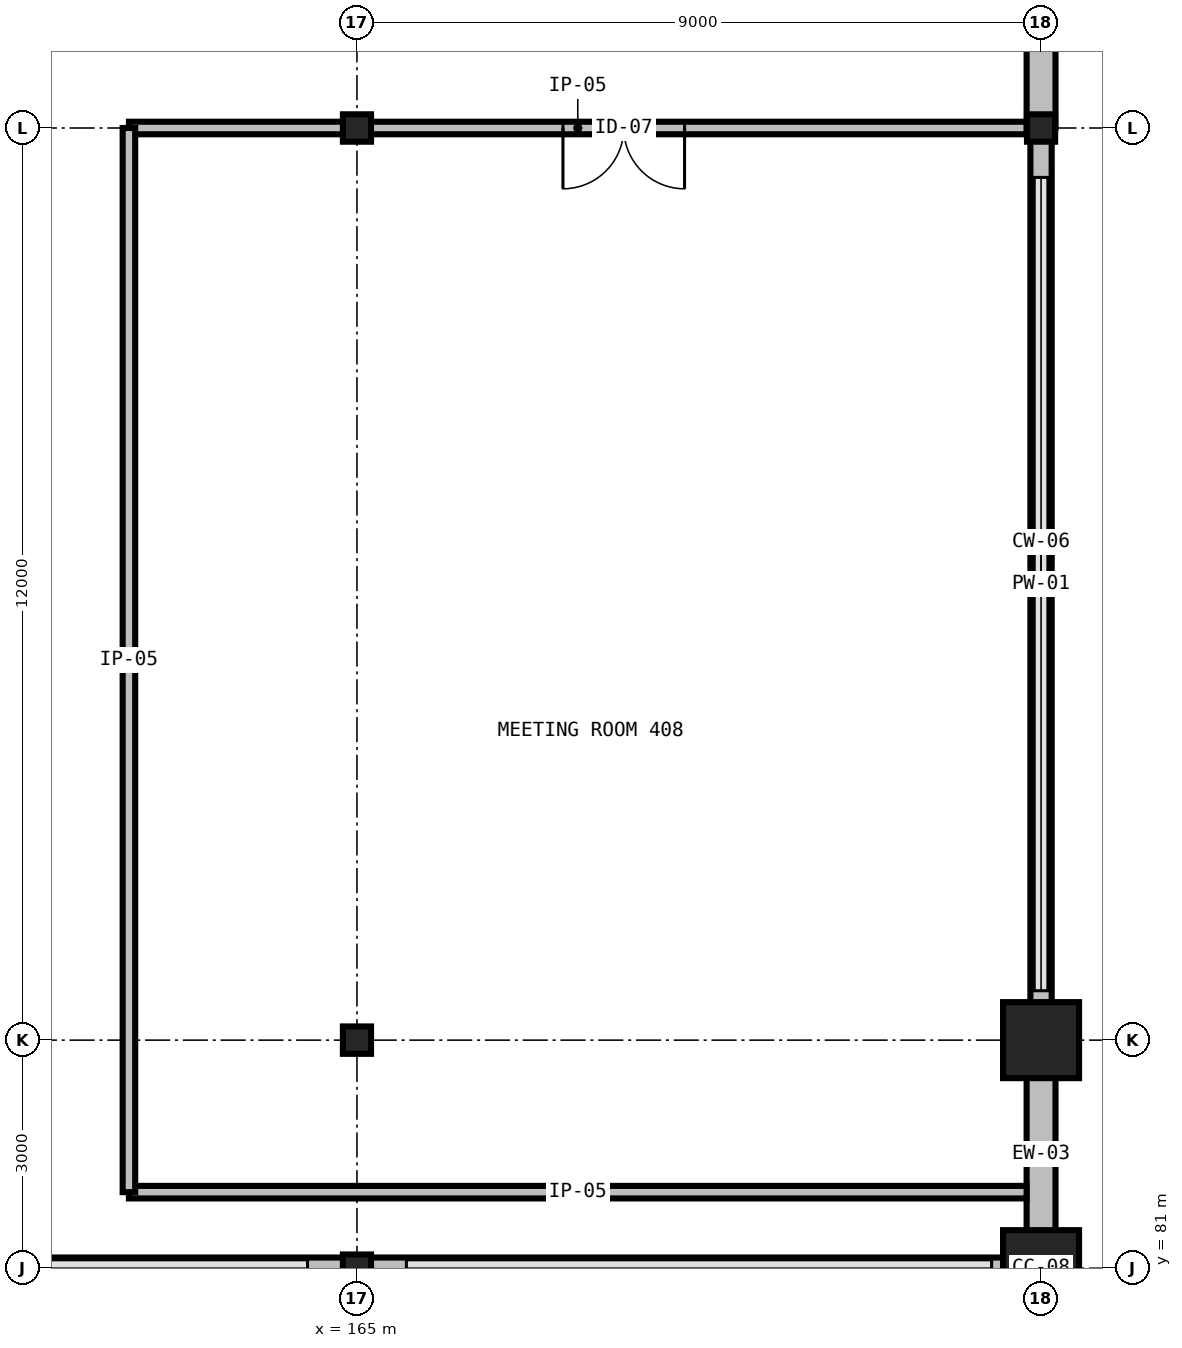
"""IFC4 building model, lengths in metres.
Left out: names, types, materials, properties, quantities, classifications, styles, units other than length and angle.
Written with IfcOpenShell. Run it as: python <this file> out.ifc"""

import sys

from ifc_helpers import new_model, si_unit, direction, frame, frame_2d, origin, origin_2d, place, context, subcontext, project, spatial, rectangle, circle, i_section, extrude, element, fill, save


model = new_model("IFC4")
c1 = context("Model", 3, precision=1e-05, world=origin(), true_north=direction((0.0, 1.0)))
c2 = subcontext(c1, "Body", "Model", "MODEL_VIEW")
j1 = project(units=[si_unit("LENGTHUNIT", "METRE"), si_unit("PLANEANGLEUNIT", "RADIAN")], contexts=[c1])
p1 = place(None, origin())
s1 = spatial("IfcSite", under=j1, at=p1, CompositionType="ELEMENT")
p2 = place(p1, origin())
s2 = spatial("IfcBuilding", under=s1, at=p2, CompositionType="ELEMENT")
p3 = place(p2, frame((0.0, 0.0, 23.4)))
s3 = spatial("IfcBuildingStorey", under=s2, at=p3, CompositionType="ELEMENT", Elevation=23.4)
for number, where, z_axis, x_axis in (
    (1, (165.0, 81.0, 0.0), (0.0, 0.0, 1.0), (1.0, 0.0, 0.0)),
    (2, (165.0, 84.0, 0.0), (0.0, 0.0, 1.0), (1.0, 0.0, 0.0)),
    (3, (165.0, 96.0, 0.0), (0.0, 0.0, 1.0), (1.0, 0.0, 0.0)),
):
    element("IfcColumn", number, at=place(p3, frame(where, z_axis=z_axis, x_axis=x_axis)), inside=s3, PredefinedType="COLUMN", context=c2, shape_type="SweptSolid", body=[
        extrude(i_section(OverallWidth=0.37, OverallDepth=0.36, WebThickness=0.012, FlangeThickness=0.02, FilletRadius=0.031, at=origin_2d()), origin(), (0.0, 0.0, 1.0), 3.85),
    ])
for number, where, z_axis, x_axis in (
    (4, (174.0, 81.0, 0.0), (0.0, 0.0, 1.0), (1.0, 0.0, 0.0)),
    (5, (174.0, 84.0, 0.0), (0.0, 0.0, 1.0), (1.0, 0.0, 0.0)),
):
    element("IfcColumn", number, at=place(p3, frame(where, z_axis=z_axis, x_axis=x_axis)), inside=s3, PredefinedType="COLUMN", context=c2, shape_type="SweptSolid", body=[
        extrude(circle(Radius=0.5, at=origin_2d()), origin(), (0.0, 0.0, 1.0), 3.85),
    ])
p4 = place(p3, frame((174.0, 96.0, 0.0), z_axis=(0.0, 0.0, 1.0), x_axis=(1.0, 0.0, 0.0)))
e6 = element("IfcColumn", 6, at=p4, inside=s3, PredefinedType="COLUMN", context=c2, shape_type="SweptSolid", body=[
    extrude(i_section(OverallWidth=0.37, OverallDepth=0.36, WebThickness=0.012, FlangeThickness=0.02, FilletRadius=0.031, at=origin_2d()), origin(), (0.0, 0.0, 1.0), 3.85),
])
p5 = place(p3, frame((174.0, 81.0, 0.0), z_axis=(0.0, 0.0, 1.0), x_axis=(0.0, 1.0, 0.0)))
e7 = element("IfcWall", 7, at=p5, inside=s3, PredefinedType="STANDARD", context=c2, shape_type="SweptSolid", body=[
    extrude(rectangle(XDim=3.0, YDim=0.38, at=frame_2d((1.5, 0.0))), origin(), (0.0, 0.0, 1.0), 3.119),
])
p6 = place(p3, frame((174.0, 84.0, 0.0), z_axis=(0.0, 0.0, 1.0), x_axis=(0.0, 1.0, 0.0)))
e8 = element("IfcWall", 8, at=p6, inside=s3, PredefinedType="PARAPET", context=c2, shape_type="SweptSolid", body=[
    extrude(rectangle(XDim=12.0, YDim=0.28, at=frame_2d((6.0, 0.0))), origin(), (0.0, 0.0, 1.0), 0.2),
])
p7 = place(p3, frame((174.0, 96.0, 0.0), z_axis=(0.0, 0.0, 1.0), x_axis=(0.0, 1.0, 0.0)))
e9 = element("IfcWall", 9, at=p7, inside=s3, PredefinedType="STANDARD", context=c2, shape_type="SweptSolid", body=[
    extrude(rectangle(XDim=9.0, YDim=0.38, at=frame_2d((4.5, 0.0))), origin(), (0.0, 0.0, 1.0), 3.119),
])
for number, where, z_axis, x_axis in (
    (10, (156.0, 81.0, 0.0), (0.0, 0.0, 1.0), (1.0, 0.0, 0.0)),
    (11, (165.0, 81.0, 0.0), (0.0, 0.0, 1.0), (1.0, 0.0, 0.0)),
):
    element("IfcWall", number, at=place(p3, frame(where, z_axis=z_axis, x_axis=x_axis)), inside=s3, PredefinedType="PARAPET", context=c2, shape_type="SweptSolid", body=[
        extrude(rectangle(XDim=9.0, YDim=0.28, at=frame_2d((4.5, 0.0))), origin(), (0.0, 0.0, 1.0), 0.2),
    ])
p8 = place(p3, frame((138.0, 81.14, 3.85), z_axis=(0.0, 0.0, 1.0), x_axis=(1.0, 0.0, 0.0)))
e12 = element("IfcWall", 12, at=p8, inside=s3, PredefinedType="PARAPET", context=c2, shape_type="SweptSolid", body=[
    extrude(rectangle(XDim=36.0, YDim=0.28, at=frame_2d((18.0, 0.0))), origin(), (0.0, 0.0, 1.0), 1.2),
])
p9 = place(p3, frame((173.86, 81.28, 3.85), z_axis=(0.0, 0.0, 1.0), x_axis=(0.0, 1.0, 0.0)))
e13 = element("IfcWall", 13, at=p9, inside=s3, PredefinedType="PARAPET", context=c2, shape_type="SweptSolid", body=[
    extrude(rectangle(XDim=35.44, YDim=0.28, at=frame_2d((17.72, 0.0))), origin(), (0.0, 0.0, 1.0), 1.2),
])
p10 = place(p3, frame((162.0, 82.0, 0.0), z_axis=(0.0, 0.0, 1.0), x_axis=(1.0, 0.0, 0.0)))
e14 = element("IfcWall", 14, at=p10, inside=s3, PredefinedType="PARTITIONING", context=c2, shape_type="SweptSolid", body=[
    extrude(rectangle(XDim=11.81, YDim=0.165, at=frame_2d((5.905, 0.0))), origin(), (0.0, 0.0, 1.0), 3.53),
])
p11 = place(p3, frame((173.81, 96.0, 0.0), z_axis=(0.0, 0.0, 1.0), x_axis=(-1.0, 0.0, 0.0)))
e15 = element("IfcWall", 15, at=p11, inside=s3, PredefinedType="PARTITIONING", context=c2, shape_type="SweptSolid", body=[
    extrude(rectangle(XDim=11.81, YDim=0.165, at=frame_2d((5.905, 0.0))), origin(), (0.0, 0.0, 1.0), 2.837),
])
p12 = place(p11, frame((4.5, 0.0, 0.0)))
e16 = element("IfcOpeningElement", 16, at=p12, cuts=e15, PredefinedType="OPENING", context=c2, shape_type="SweptSolid", body=[
    extrude(rectangle(XDim=1.6, YDim=2.25, at=frame_2d((0.8, 1.125))), frame((0.0, 0.098, 0.0), z_axis=(0.0, -1.0, 0.0), x_axis=(1.0, 0.0, 0.0)), (0.0, 0.0, 1.0), 0.195),
])
p13 = place(p3, frame((162.0, 96.0, 0.0), z_axis=(0.0, 0.0, 1.0), x_axis=(0.0, -1.0, 0.0)))
e17 = element("IfcWall", 17, at=p13, inside=s3, PredefinedType="PARTITIONING", context=c2, shape_type="SweptSolid", body=[
    extrude(rectangle(XDim=14.0, YDim=0.165, at=frame_2d((7.0, 0.0))), origin(), (0.0, 0.0, 1.0), 3.53),
])
p14 = place(p12, origin())
e18 = element("IfcDoor", 18, at=p14, inside=s3, OperationType="DOUBLE_DOOR_SINGLE_SWING", PredefinedType="DOOR", context=c2, shape_type="SweptSolid", body=[
    extrude(rectangle(XDim=1.6, YDim=2.25, at=frame_2d((0.8, 1.125))), frame((0.0, 0.025, 0.0), z_axis=(0.0, -1.0, 0.0), x_axis=(1.0, 0.0, 0.0)), (0.0, 0.0, 1.0), 0.05),
])
fill(e16, e18)
save(model, sys.argv[1])
